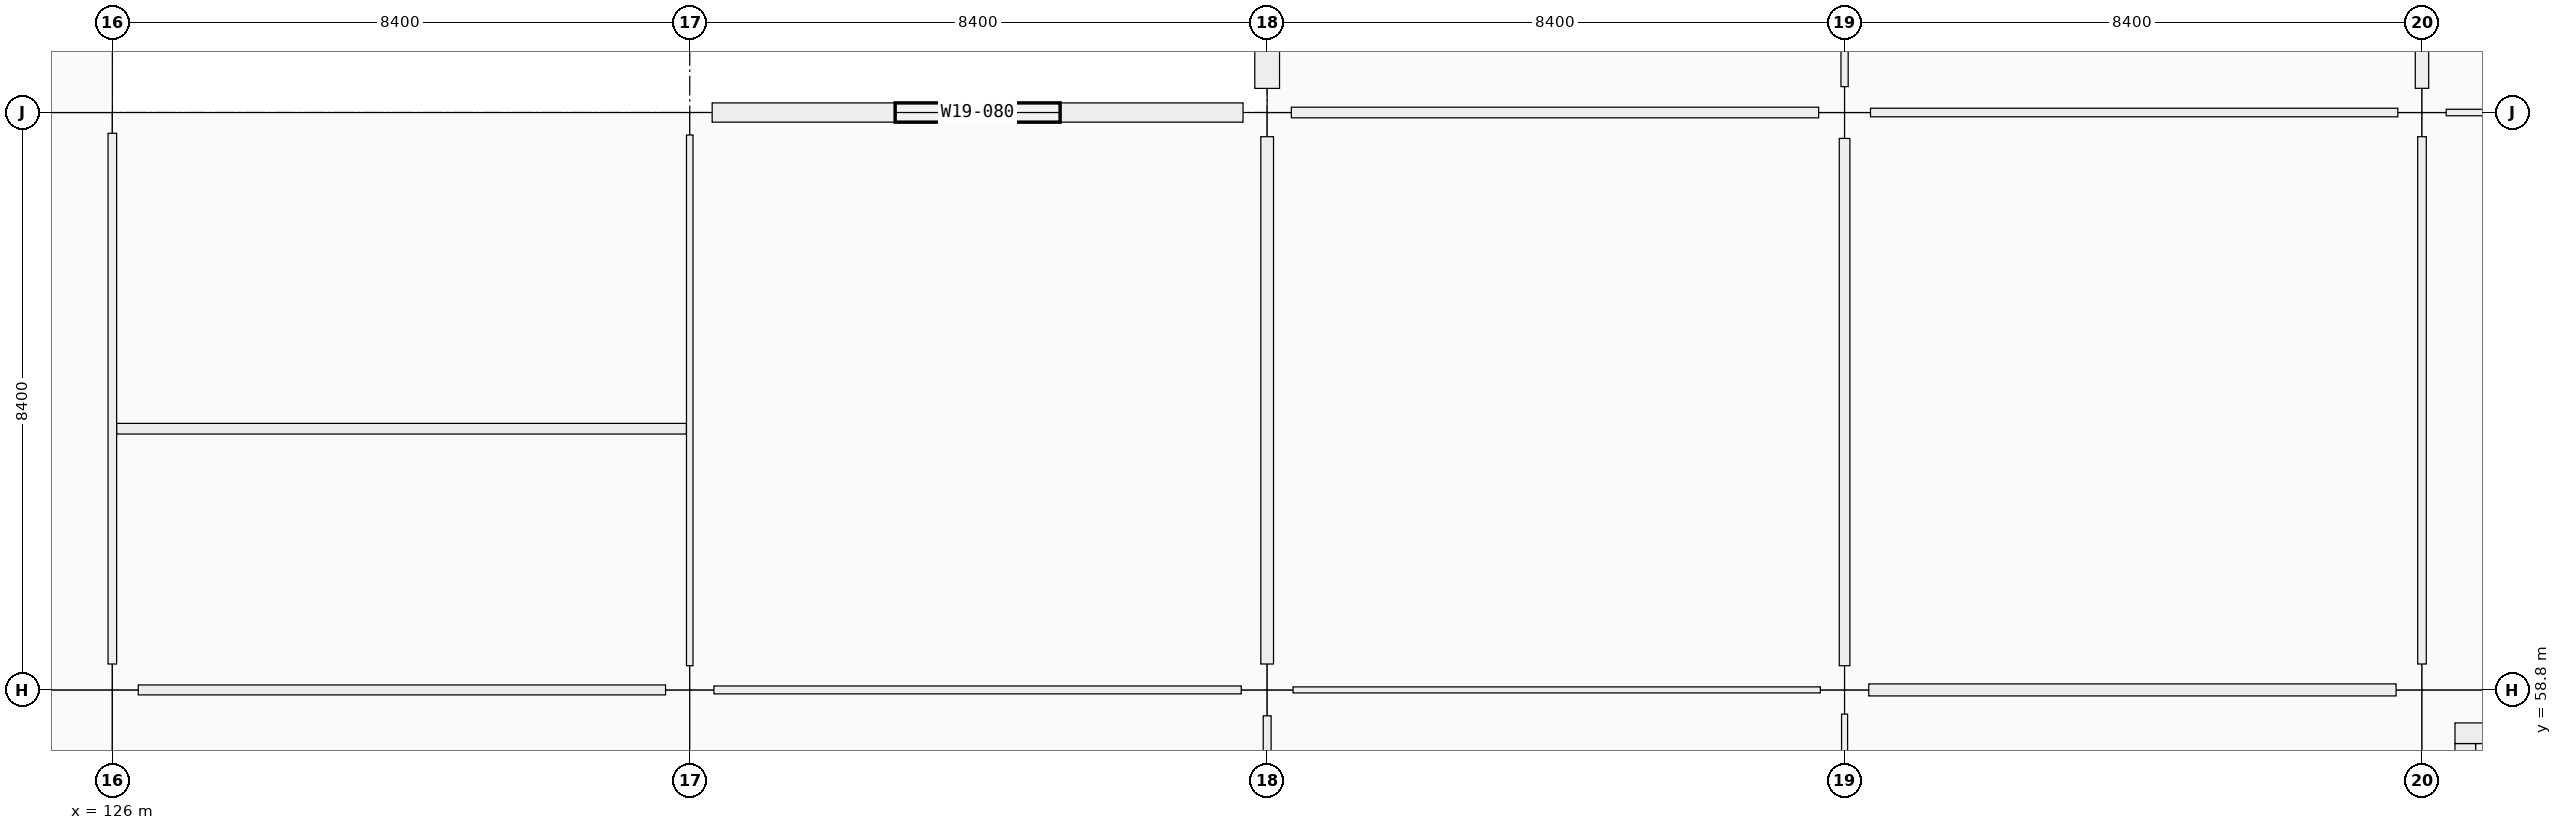
"""IFC4 building model, lengths in metres.
Left out: names, types, materials, properties, quantities, classifications, styles, units other than length and angle.
Written with IfcOpenShell. Run it as: python <this file> out.ifc"""

import sys

from ifc_helpers import new_model, si_unit, direction, frame, frame_2d, origin, origin_2d, place, context, subcontext, project, spatial, rectangle, extrude, element, fill, save


model = new_model("IFC4")
c1 = context("Model", 3, precision=1e-05, world=origin(), true_north=direction((0.0, 1.0)))
c2 = subcontext(c1, "Body", "Model", "MODEL_VIEW")
j1 = project(units=[si_unit("LENGTHUNIT", "METRE"), si_unit("PLANEANGLEUNIT", "RADIAN")], contexts=[c1])
p1 = place(None, origin())
s1 = spatial("IfcSite", under=j1, at=p1, CompositionType="ELEMENT")
p2 = place(p1, origin())
s2 = spatial("IfcBuilding", under=s1, at=p2, CompositionType="ELEMENT")
p3 = place(p2, frame((0.0, 0.0, 5.76)))
s3 = spatial("IfcBuildingStorey", under=s2, at=p3, CompositionType="ELEMENT", Elevation=5.76)
p4 = place(p3, frame((126.0, 58.8, 0.0), z_axis=(0.0, 0.0, 1.0), x_axis=(1.0, 0.0, 0.0)))
e1 = element("IfcColumn", 1, at=p4, inside=s3, PredefinedType="COLUMN", context=c2, shape_type="SweptSolid", body=[
    extrude(rectangle(XDim=0.75, YDim=0.75, at=origin_2d()), origin(), (0.0, 0.0, 1.0), 4.5),
])
p5 = place(p3, frame((126.0, 67.2, 0.0), z_axis=(0.0, 0.0, 1.0), x_axis=(1.0, 0.0, 0.0)))
e2 = element("IfcColumn", 2, at=p5, inside=s3, PredefinedType="COLUMN", context=c2, shape_type="SweptSolid", body=[
    extrude(rectangle(XDim=0.6, YDim=0.6, at=origin_2d()), origin(), (0.0, 0.0, 1.0), 4.5),
])
p6 = place(p3, frame((134.4, 58.8, 0.0), z_axis=(0.0, 0.0, 1.0), x_axis=(1.0, 0.0, 0.0)))
e3 = element("IfcColumn", 3, at=p6, inside=s3, PredefinedType="COLUMN", context=c2, shape_type="SweptSolid", body=[
    extrude(rectangle(XDim=0.7, YDim=0.7, at=origin_2d()), origin(), (0.0, 0.0, 1.0), 4.5),
])
p7 = place(p3, frame((134.4, 67.2, 0.0), z_axis=(0.0, 0.0, 1.0), x_axis=(1.0, 0.0, 0.0)))
e4 = element("IfcColumn", 4, at=p7, inside=s3, PredefinedType="COLUMN", context=c2, shape_type="SweptSolid", body=[
    extrude(rectangle(XDim=0.65, YDim=0.65, at=origin_2d()), origin(), (0.0, 0.0, 1.0), 4.5),
])
p8 = place(p3, frame((142.8, 58.8, 0.0), z_axis=(0.0, 0.0, 1.0), x_axis=(1.0, 0.0, 0.0)))
e5 = element("IfcColumn", 5, at=p8, inside=s3, PredefinedType="COLUMN", context=c2, shape_type="SweptSolid", body=[
    extrude(rectangle(XDim=0.75, YDim=0.75, at=origin_2d()), origin(), (0.0, 0.0, 1.0), 4.5),
])
for number, where, z_axis, x_axis in (
    (6, (142.8, 67.2, 0.0), (0.0, 0.0, 1.0), (1.0, 0.0, 0.0)),
    (7, (151.2, 58.8, 0.0), (0.0, 0.0, 1.0), (1.0, 0.0, 0.0)),
):
    element("IfcColumn", number, at=place(p3, frame(where, z_axis=z_axis, x_axis=x_axis)), inside=s3, PredefinedType="COLUMN", context=c2, shape_type="SweptSolid", body=[
        extrude(rectangle(XDim=0.7, YDim=0.7, at=origin_2d()), origin(), (0.0, 0.0, 1.0), 4.5),
    ])
for number, where, z_axis, x_axis in (
    (8, (151.2, 67.2, 0.0), (0.0, 0.0, 1.0), (1.0, 0.0, 0.0)),
    (9, (159.6, 58.8, 0.0), (0.0, 0.0, 1.0), (1.0, 0.0, 0.0)),
):
    element("IfcColumn", number, at=place(p3, frame(where, z_axis=z_axis, x_axis=x_axis)), inside=s3, PredefinedType="COLUMN", context=c2, shape_type="SweptSolid", body=[
        extrude(rectangle(XDim=0.75, YDim=0.75, at=origin_2d()), origin(), (0.0, 0.0, 1.0), 4.5),
    ])
p9 = place(p3, frame((159.6, 67.2, 0.0), z_axis=(0.0, 0.0, 1.0), x_axis=(1.0, 0.0, 0.0)))
e10 = element("IfcColumn", 10, at=p9, inside=s3, PredefinedType="COLUMN", context=c2, shape_type="SweptSolid", body=[
    extrude(rectangle(XDim=0.7, YDim=0.7, at=origin_2d()), origin(), (0.0, 0.0, 1.0), 4.5),
])
p10 = place(p3, frame((134.726, 67.2, 0.0), z_axis=(0.0, 0.0, 1.0), x_axis=(1.0, 0.0, 0.0)))
e11 = element("IfcWall", 11, at=p10, inside=s3, PredefinedType="SOLIDWALL", context=c2, shape_type="SweptSolid", body=[
    extrude(rectangle(XDim=7.723, YDim=0.28, at=frame_2d((3.861, 0.0))), origin(), (0.0, 0.0, 1.0), 3.4),
])
p11 = place(p10, frame((2.662, 0.0, 0.9)))
e12 = element("IfcOpeningElement", 12, at=p11, cuts=e11, PredefinedType="OPENING", context=c2, shape_type="SweptSolid", body=[
    extrude(rectangle(XDim=2.4, YDim=2.25, at=frame_2d((1.2, 1.125))), frame((0.0, 0.14, 0.0), z_axis=(0.0, -1.0, 0.0), x_axis=(1.0, 0.0, 0.0)), (0.0, 0.0, 1.0), 0.28),
])
p12 = place(p3, frame((142.8, 67.551, 0.0), z_axis=(0.0, 0.0, 1.0), x_axis=(0.0, 1.0, 0.0)))
e13 = element("IfcWall", 13, at=p12, inside=s3, PredefinedType="SOLIDWALL", context=c2, shape_type="SweptSolid", body=[
    extrude(rectangle(XDim=7.773, YDim=0.36, at=frame_2d((3.886, 0.0))), origin(), (0.0, 0.0, 1.0), 3.4),
])
p13 = place(p12, frame((3.036, 0.0, 0.9)))
e14 = element("IfcOpeningElement", 14, at=p13, cuts=e13, PredefinedType="OPENING", context=c2, shape_type="SweptSolid", body=[
    extrude(rectangle(XDim=1.7, YDim=1.85, at=frame_2d((0.85, 0.925))), frame((0.0, 0.18, 0.0), z_axis=(0.0, -1.0, 0.0), x_axis=(1.0, 0.0, 0.0)), (0.0, 0.0, 1.0), 0.36),
])
p14 = place(p3, frame((160.23, 51.18, 0.0), z_axis=(0.0, 0.0, 1.0), x_axis=(0.0, 1.0, 0.0)))
e15 = element("IfcWall", 15, at=p14, inside=s3, PredefinedType="SHEAR", context=c2, shape_type="SweptSolid", body=[
    extrude(rectangle(XDim=6.84, YDim=0.3, at=frame_2d((3.42, 0.0))), origin(), (0.0, 0.0, 1.0), 4.5),
])
p15 = place(p3, frame((160.08, 58.17, 0.0), z_axis=(0.0, 0.0, 1.0), x_axis=(1.0, 0.0, 0.0)))
e16 = element("IfcWall", 16, at=p15, inside=s3, PredefinedType="SHEAR", context=c2, shape_type="SweptSolid", body=[
    extrude(rectangle(XDim=7.44, YDim=0.3, at=frame_2d((3.72, 0.0))), origin(), (0.0, 0.0, 1.0), 4.5),
])
p16 = place(p3, frame((126.377, 58.8, 0.0), z_axis=(0.0, 0.0, 1.0), x_axis=(1.0, 0.0, 0.0)))
e17 = element("IfcWall", 17, at=p16, inside=s3, PredefinedType="PARTITIONING", context=c2, shape_type="SweptSolid", body=[
    extrude(rectangle(XDim=7.671, YDim=0.145, at=frame_2d((3.835, 0.0))), origin(), (0.0, 0.0, 1.0), 2.4),
])
p17 = place(p3, frame((134.752, 58.8, 0.0), z_axis=(0.0, 0.0, 1.0), x_axis=(1.0, 0.0, 0.0)))
e18 = element("IfcWall", 18, at=p17, inside=s3, PredefinedType="PARTITIONING", context=c2, shape_type="SweptSolid", body=[
    extrude(rectangle(XDim=7.671, YDim=0.115, at=frame_2d((3.835, 0.0))), origin(), (0.0, 0.0, 1.0), 2.4),
])
p18 = place(p17, frame((3.356, 0.0, 0.0)))
e19 = element("IfcOpeningElement", 19, at=p18, cuts=e18, PredefinedType="OPENING", context=c2, shape_type="SweptSolid", body=[
    extrude(rectangle(XDim=0.96, YDim=2.18, at=frame_2d((0.48, 1.09))), frame((0.0, 0.058, 0.0), z_axis=(0.0, -1.0, 0.0), x_axis=(1.0, 0.0, 0.0)), (0.0, 0.0, 1.0), 0.115),
])
p19 = place(p3, frame((143.177, 58.8, 0.0), z_axis=(0.0, 0.0, 1.0), x_axis=(1.0, 0.0, 0.0)))
e20 = element("IfcWall", 20, at=p19, inside=s3, PredefinedType="PARTITIONING", context=c2, shape_type="SweptSolid", body=[
    extrude(rectangle(XDim=7.671, YDim=0.088, at=frame_2d((3.835, 0.0))), origin(), (0.0, 0.0, 1.0), 2.4),
])
p20 = place(p3, frame((143.152, 67.2, 0.0), z_axis=(0.0, 0.0, 1.0), x_axis=(1.0, 0.0, 0.0)))
e21 = element("IfcWall", 21, at=p20, inside=s3, PredefinedType="PARTITIONING", context=c2, shape_type="SweptSolid", body=[
    extrude(rectangle(XDim=7.671, YDim=0.155, at=frame_2d((3.835, 0.0))), origin(), (0.0, 0.0, 1.0), 2.4),
])
p21 = place(p20, frame((3.336, 0.0, 0.0)))
e22 = element("IfcOpeningElement", 22, at=p21, cuts=e21, PredefinedType="OPENING", context=c2, shape_type="SweptSolid", body=[
    extrude(rectangle(XDim=1.0, YDim=2.2, at=frame_2d((0.5, 1.1))), frame((0.0, 0.078, 0.0), z_axis=(0.0, -1.0, 0.0), x_axis=(1.0, 0.0, 0.0)), (0.0, 0.0, 1.0), 0.155),
])
p22 = place(p3, frame((151.552, 58.8, 0.0), z_axis=(0.0, 0.0, 1.0), x_axis=(1.0, 0.0, 0.0)))
e23 = element("IfcWall", 23, at=p22, inside=s3, PredefinedType="PARTITIONING", context=c2, shape_type="SweptSolid", body=[
    extrude(rectangle(XDim=7.671, YDim=0.175, at=frame_2d((3.835, 0.0))), origin(), (0.0, 0.0, 1.0), 2.4),
])
p23 = place(p22, frame((3.376, 0.0, 0.0)))
e24 = element("IfcOpeningElement", 24, at=p23, cuts=e23, PredefinedType="OPENING", context=c2, shape_type="SweptSolid", body=[
    extrude(rectangle(XDim=0.92, YDim=2.15, at=frame_2d((0.46, 1.075))), frame((0.0, 0.087, 0.0), z_axis=(0.0, -1.0, 0.0), x_axis=(1.0, 0.0, 0.0)), (0.0, 0.0, 1.0), 0.175),
])
p24 = place(p3, frame((151.577, 67.2, 0.0), z_axis=(0.0, 0.0, 1.0), x_axis=(1.0, 0.0, 0.0)))
e25 = element("IfcWall", 25, at=p24, inside=s3, PredefinedType="PARTITIONING", context=c2, shape_type="SweptSolid", body=[
    extrude(rectangle(XDim=7.671, YDim=0.125, at=frame_2d((3.835, 0.0))), origin(), (0.0, 0.0, 1.0), 2.4),
])
p25 = place(p24, frame((3.311, 0.0, 0.0)))
e26 = element("IfcOpeningElement", 26, at=p25, cuts=e25, PredefinedType="OPENING", context=c2, shape_type="SweptSolid", body=[
    extrude(rectangle(XDim=1.05, YDim=2.12, at=frame_2d((0.525, 1.06))), frame((0.0, 0.062, 0.0), z_axis=(0.0, -1.0, 0.0), x_axis=(1.0, 0.0, 0.0)), (0.0, 0.0, 1.0), 0.125),
])
p26 = place(p3, frame((159.952, 67.2, 0.0), z_axis=(0.0, 0.0, 1.0), x_axis=(1.0, 0.0, 0.0)))
e27 = element("IfcWall", 27, at=p26, inside=s3, PredefinedType="PARTITIONING", context=c2, shape_type="SweptSolid", body=[
    extrude(rectangle(XDim=7.671, YDim=0.095, at=frame_2d((3.835, 0.0))), origin(), (0.0, 0.0, 1.0), 2.4),
])
p27 = place(p26, frame((3.351, 0.0, 0.0)))
e28 = element("IfcOpeningElement", 28, at=p27, cuts=e27, PredefinedType="OPENING", context=c2, shape_type="SweptSolid", body=[
    extrude(rectangle(XDim=0.97, YDim=2.12, at=frame_2d((0.485, 1.06))), frame((0.0, 0.047, 0.0), z_axis=(0.0, -1.0, 0.0), x_axis=(1.0, 0.0, 0.0)), (0.0, 0.0, 1.0), 0.095),
])
p28 = place(p3, frame((126.0, 59.177, 0.0), z_axis=(0.0, 0.0, 1.0), x_axis=(0.0, 1.0, 0.0)))
e29 = element("IfcWall", 29, at=p28, inside=s3, PredefinedType="PARTITIONING", context=c2, shape_type="SweptSolid", body=[
    extrude(rectangle(XDim=7.721, YDim=0.125, at=frame_2d((3.86, 0.0))), origin(), (0.0, 0.0, 1.0), 2.4),
])
p29 = place(p28, frame((1.143, 0.0, 0.0)))
e30 = element("IfcOpeningElement", 30, at=p29, cuts=e29, PredefinedType="OPENING", context=c2, shape_type="SweptSolid", body=[
    extrude(rectangle(XDim=1.04, YDim=2.2, at=frame_2d((0.52, 1.1))), frame((0.0, 0.062, 0.0), z_axis=(0.0, -1.0, 0.0), x_axis=(1.0, 0.0, 0.0)), (0.0, 0.0, 1.0), 0.125),
])
p30 = place(p28, frame((5.073, 0.0, 0.0)))
e31 = element("IfcOpeningElement", 31, at=p30, cuts=e29, PredefinedType="OPENING", context=c2, shape_type="SweptSolid", body=[
    extrude(rectangle(XDim=1.02, YDim=2.2, at=frame_2d((0.51, 1.1))), frame((0.0, 0.062, 0.0), z_axis=(0.0, -1.0, 0.0), x_axis=(1.0, 0.0, 0.0)), (0.0, 0.0, 1.0), 0.125),
])
p31 = place(p3, frame((134.4, 59.152, 0.0), z_axis=(0.0, 0.0, 1.0), x_axis=(0.0, 1.0, 0.0)))
e32 = element("IfcWall", 32, at=p31, inside=s3, PredefinedType="PARTITIONING", context=c2, shape_type="SweptSolid", body=[
    extrude(rectangle(XDim=7.721, YDim=0.095, at=frame_2d((3.86, 0.0))), origin(), (0.0, 0.0, 1.0), 2.4),
])
p32 = place(p3, frame((142.8, 50.752, 0.0), z_axis=(0.0, 0.0, 1.0), x_axis=(0.0, 1.0, 0.0)))
e33 = element("IfcWall", 33, at=p32, inside=s3, PredefinedType="PARTITIONING", context=c2, shape_type="SweptSolid", body=[
    extrude(rectangle(XDim=7.671, YDim=0.115, at=frame_2d((3.835, 0.0))), origin(), (0.0, 0.0, 1.0), 2.4),
])
p33 = place(p32, frame((0.623, 0.0, 0.0)))
e34 = element("IfcOpeningElement", 34, at=p33, cuts=e33, PredefinedType="OPENING", context=c2, shape_type="SweptSolid", body=[
    extrude(rectangle(XDim=0.98, YDim=2.08, at=frame_2d((0.49, 1.04))), frame((0.0, 0.058, 0.0), z_axis=(0.0, -1.0, 0.0), x_axis=(1.0, 0.0, 0.0)), (0.0, 0.0, 1.0), 0.115),
])
p34 = place(p32, frame((4.563, 0.0, 0.0)))
e35 = element("IfcOpeningElement", 35, at=p34, cuts=e33, PredefinedType="OPENING", context=c2, shape_type="SweptSolid", body=[
    extrude(rectangle(XDim=0.94, YDim=2.08, at=frame_2d((0.47, 1.04))), frame((0.0, 0.058, 0.0), z_axis=(0.0, -1.0, 0.0), x_axis=(1.0, 0.0, 0.0)), (0.0, 0.0, 1.0), 0.115),
])
p35 = place(p3, frame((142.8, 59.177, 0.0), z_axis=(0.0, 0.0, 1.0), x_axis=(0.0, 1.0, 0.0)))
e36 = element("IfcWall", 36, at=p35, inside=s3, PredefinedType="PARTITIONING", context=c2, shape_type="SweptSolid", body=[
    extrude(rectangle(XDim=7.671, YDim=0.185, at=frame_2d((3.835, 0.0))), origin(), (0.0, 0.0, 1.0), 2.4),
])
p36 = place(p35, frame((3.376, 0.0, 0.0)))
e37 = element("IfcOpeningElement", 37, at=p36, cuts=e36, PredefinedType="OPENING", context=c2, shape_type="SweptSolid", body=[
    extrude(rectangle(XDim=0.92, YDim=2.15, at=frame_2d((0.46, 1.075))), frame((0.0, 0.093, 0.0), z_axis=(0.0, -1.0, 0.0), x_axis=(1.0, 0.0, 0.0)), (0.0, 0.0, 1.0), 0.185),
])
p37 = place(p3, frame((151.2, 50.777, 0.0), z_axis=(0.0, 0.0, 1.0), x_axis=(0.0, 1.0, 0.0)))
e38 = element("IfcWall", 38, at=p37, inside=s3, PredefinedType="PARTITIONING", context=c2, shape_type="SweptSolid", body=[
    extrude(rectangle(XDim=7.671, YDim=0.088, at=frame_2d((3.835, 0.0))), origin(), (0.0, 0.0, 1.0), 2.4),
])
p38 = place(p3, frame((151.2, 59.152, 0.0), z_axis=(0.0, 0.0, 1.0), x_axis=(0.0, 1.0, 0.0)))
e39 = element("IfcWall", 39, at=p38, inside=s3, PredefinedType="PARTITIONING", context=c2, shape_type="SweptSolid", body=[
    extrude(rectangle(XDim=7.671, YDim=0.155, at=frame_2d((3.835, 0.0))), origin(), (0.0, 0.0, 1.0), 2.4),
])
p39 = place(p38, frame((3.331, 0.0, 0.0)))
e40 = element("IfcOpeningElement", 40, at=p39, cuts=e39, PredefinedType="OPENING", context=c2, shape_type="SweptSolid", body=[
    extrude(rectangle(XDim=1.01, YDim=2.12, at=frame_2d((0.505, 1.06))), frame((0.0, 0.078, 0.0), z_axis=(0.0, -1.0, 0.0), x_axis=(1.0, 0.0, 0.0)), (0.0, 0.0, 1.0), 0.155),
])
p40 = place(p3, frame((151.2, 67.577, 0.0), z_axis=(0.0, 0.0, 1.0), x_axis=(0.0, 1.0, 0.0)))
e41 = element("IfcWall", 41, at=p40, inside=s3, PredefinedType="PARTITIONING", context=c2, shape_type="SweptSolid", body=[
    extrude(rectangle(XDim=7.746, YDim=0.105, at=frame_2d((3.873, 0.0))), origin(), (0.0, 0.0, 1.0), 2.4),
])
p41 = place(p40, frame((3.388, 0.0, 0.0)))
e42 = element("IfcOpeningElement", 42, at=p41, cuts=e41, PredefinedType="OPENING", context=c2, shape_type="SweptSolid", body=[
    extrude(rectangle(XDim=0.97, YDim=2.12, at=frame_2d((0.485, 1.06))), frame((0.0, 0.052, 0.0), z_axis=(0.0, -1.0, 0.0), x_axis=(1.0, 0.0, 0.0)), (0.0, 0.0, 1.0), 0.105),
])
p42 = place(p3, frame((159.6, 59.177, 0.0), z_axis=(0.0, 0.0, 1.0), x_axis=(0.0, 1.0, 0.0)))
e43 = element("IfcWall", 43, at=p42, inside=s3, PredefinedType="PARTITIONING", context=c2, shape_type="SweptSolid", body=[
    extrude(rectangle(XDim=7.671, YDim=0.125, at=frame_2d((3.835, 0.0))), origin(), (0.0, 0.0, 1.0), 2.4),
])
p43 = place(p42, frame((3.331, 0.0, 0.0)))
e44 = element("IfcOpeningElement", 44, at=p43, cuts=e43, PredefinedType="OPENING", context=c2, shape_type="SweptSolid", body=[
    extrude(rectangle(XDim=1.01, YDim=2.12, at=frame_2d((0.505, 1.06))), frame((0.0, 0.062, 0.0), z_axis=(0.0, -1.0, 0.0), x_axis=(1.0, 0.0, 0.0)), (0.0, 0.0, 1.0), 0.125),
])
p44 = place(p3, frame((159.6, 67.552, 0.0), z_axis=(0.0, 0.0, 1.0), x_axis=(0.0, 1.0, 0.0)))
e45 = element("IfcWall", 45, at=p44, inside=s3, PredefinedType="PARTITIONING", context=c2, shape_type="SweptSolid", body=[
    extrude(rectangle(XDim=7.771, YDim=0.195, at=frame_2d((3.885, 0.0))), origin(), (0.0, 0.0, 1.0), 2.4),
])
p45 = place(p44, frame((3.365, 0.0, 0.0)))
e46 = element("IfcOpeningElement", 46, at=p45, cuts=e45, PredefinedType="OPENING", context=c2, shape_type="SweptSolid", body=[
    extrude(rectangle(XDim=1.04, YDim=2.2, at=frame_2d((0.52, 1.1))), frame((0.0, 0.098, 0.0), z_axis=(0.0, -1.0, 0.0), x_axis=(1.0, 0.0, 0.0)), (0.0, 0.0, 1.0), 0.195),
])
p46 = place(p3, frame((126.064, 62.6, 0.0), z_axis=(0.0, 0.0, 1.0), x_axis=(1.0, 0.0, 0.0)))
e47 = element("IfcWall", 47, at=p46, inside=s3, PredefinedType="PARTITIONING", context=c2, shape_type="SweptSolid", body=[
    extrude(rectangle(XDim=8.286, YDim=0.155, at=frame_2d((4.143, 0.0))), origin(), (0.0, 0.0, 1.0), 2.4),
])
p47 = place(p11, origin())
e48 = element("IfcWindow", 48, at=p47, inside=s3, PartitioningType="SINGLE_PANEL", PredefinedType="WINDOW", context=c2, shape_type="SweptSolid", body=[
    extrude(rectangle(XDim=2.4, YDim=2.25, at=frame_2d((1.2, 1.125))), frame((0.0, 0.03, 0.0), z_axis=(0.0, -1.0, 0.0), x_axis=(1.0, 0.0, 0.0)), (0.0, 0.0, 1.0), 0.06),
])
fill(e12, e48)
p48 = place(p29, origin())
e49 = element("IfcDoor", 49, at=p48, inside=s3, OperationType="SINGLE_SWING_RIGHT", PredefinedType="DOOR", context=c2, shape_type="SweptSolid", body=[
    extrude(rectangle(XDim=1.04, YDim=2.2, at=frame_2d((0.52, 1.1))), frame((0.0, 0.025, 0.0), z_axis=(0.0, -1.0, 0.0), x_axis=(1.0, 0.0, 0.0)), (0.0, 0.0, 1.0), 0.05),
])
fill(e30, e49)
p49 = place(p30, origin())
e50 = element("IfcDoor", 50, at=p49, inside=s3, OperationType="SINGLE_SWING_LEFT", PredefinedType="DOOR", context=c2, shape_type="SweptSolid", body=[
    extrude(rectangle(XDim=1.02, YDim=2.2, at=frame_2d((0.51, 1.1))), frame((0.0, 0.025, 0.0), z_axis=(0.0, -1.0, 0.0), x_axis=(1.0, 0.0, 0.0)), (0.0, 0.0, 1.0), 0.05),
])
fill(e31, e50)
p50 = place(p18, origin())
e51 = element("IfcDoor", 51, at=p50, inside=s3, OperationType="SINGLE_SWING_RIGHT", PredefinedType="DOOR", context=c2, shape_type="SweptSolid", body=[
    extrude(rectangle(XDim=0.96, YDim=2.18, at=frame_2d((0.48, 1.09))), frame((0.0, 0.025, 0.0), z_axis=(0.0, -1.0, 0.0), x_axis=(1.0, 0.0, 0.0)), (0.0, 0.0, 1.0), 0.05),
])
fill(e19, e51)
p51 = place(p21, origin())
e52 = element("IfcDoor", 52, at=p51, inside=s3, OperationType="SINGLE_SWING_RIGHT", PredefinedType="DOOR", context=c2, shape_type="SweptSolid", body=[
    extrude(rectangle(XDim=1.0, YDim=2.2, at=frame_2d((0.5, 1.1))), frame((0.0, 0.025, 0.0), z_axis=(0.0, -1.0, 0.0), x_axis=(1.0, 0.0, 0.0)), (0.0, 0.0, 1.0), 0.05),
])
fill(e22, e52)
p52 = place(p23, origin())
e53 = element("IfcDoor", 53, at=p52, inside=s3, OperationType="SINGLE_SWING_RIGHT", PredefinedType="DOOR", context=c2, shape_type="SweptSolid", body=[
    extrude(rectangle(XDim=0.92, YDim=2.15, at=frame_2d((0.46, 1.075))), frame((0.0, 0.025, 0.0), z_axis=(0.0, -1.0, 0.0), x_axis=(1.0, 0.0, 0.0)), (0.0, 0.0, 1.0), 0.05),
])
fill(e24, e53)
p53 = place(p25, origin())
e54 = element("IfcDoor", 54, at=p53, inside=s3, OperationType="SINGLE_SWING_LEFT", PredefinedType="DOOR", context=c2, shape_type="SweptSolid", body=[
    extrude(rectangle(XDim=1.05, YDim=2.12, at=frame_2d((0.525, 1.06))), frame((0.0, 0.025, 0.0), z_axis=(0.0, -1.0, 0.0), x_axis=(1.0, 0.0, 0.0)), (0.0, 0.0, 1.0), 0.05),
])
fill(e26, e54)
p54 = place(p36, origin())
e55 = element("IfcDoor", 55, at=p54, inside=s3, OperationType="SINGLE_SWING_RIGHT", PredefinedType="DOOR", context=c2, shape_type="SweptSolid", body=[
    extrude(rectangle(XDim=0.92, YDim=2.15, at=frame_2d((0.46, 1.075))), frame((0.0, 0.025, 0.0), z_axis=(0.0, -1.0, 0.0), x_axis=(1.0, 0.0, 0.0)), (0.0, 0.0, 1.0), 0.05),
])
fill(e37, e55)
p55 = place(p43, origin())
e56 = element("IfcDoor", 56, at=p55, inside=s3, OperationType="SINGLE_SWING_RIGHT", PredefinedType="DOOR", context=c2, shape_type="SweptSolid", body=[
    extrude(rectangle(XDim=1.01, YDim=2.12, at=frame_2d((0.505, 1.06))), frame((0.0, 0.025, 0.0), z_axis=(0.0, -1.0, 0.0), x_axis=(1.0, 0.0, 0.0)), (0.0, 0.0, 1.0), 0.05),
])
fill(e44, e56)
p56 = place(p39, origin())
e57 = element("IfcDoor", 57, at=p56, inside=s3, OperationType="SINGLE_SWING_RIGHT", PredefinedType="DOOR", context=c2, shape_type="SweptSolid", body=[
    extrude(rectangle(XDim=1.01, YDim=2.12, at=frame_2d((0.505, 1.06))), frame((0.0, 0.025, 0.0), z_axis=(0.0, -1.0, 0.0), x_axis=(1.0, 0.0, 0.0)), (0.0, 0.0, 1.0), 0.05),
])
fill(e40, e57)
save(model, sys.argv[1])
